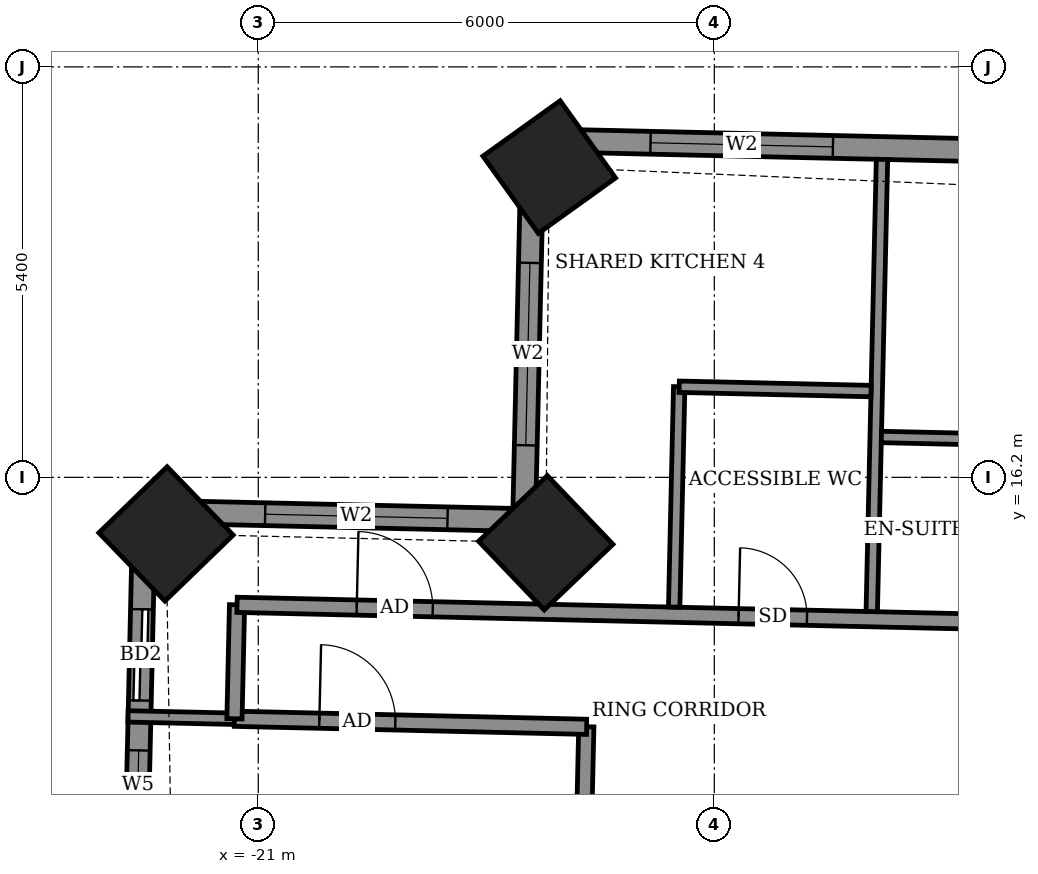
"""IFC4 building model, lengths in metres.
Left out: names, types, materials, properties, quantities, classifications, styles, units other than length and angle.
Written with IfcOpenShell. Run it as: python <this file> out.ifc"""

import sys

from ifc_helpers import new_model, si_unit, direction, frame, frame_2d, origin, origin_2d, place, context, subcontext, project, spatial, rectangle, extrude, element, fill, save


model = new_model("IFC4")
c1 = context("Model", 3, precision=1e-05, world=origin(), true_north=direction((0.0, 1.0)))
c2 = subcontext(c1, "Body", "Model", "MODEL_VIEW")
j1 = project(units=[si_unit("LENGTHUNIT", "METRE"), si_unit("PLANEANGLEUNIT", "RADIAN")], contexts=[c1])
p1 = place(None, origin())
s1 = spatial("IfcSite", under=j1, at=p1, CompositionType="ELEMENT")
p2 = place(p1, origin())
s2 = spatial("IfcBuilding", under=s1, at=p2, CompositionType="ELEMENT")
p3 = place(p2, frame((0.0, 0.0, 163.5)))
s3 = spatial("IfcBuildingStorey", under=s2, at=p3, CompositionType="ELEMENT", Elevation=163.5)
for number, where, z_axis, x_axis in (
    (1, (-17.172, 20.282, -0.55), (0.0, 0.0, 1.0), (-0.813, -0.583, 0.0)),
    (2, (-17.217, 15.339, -0.55), (0.0, 0.0, 1.0), (-0.723, -0.691, 0.0)),
    (3, (-22.213, 15.456, -0.55), (0.0, 0.0, 1.0), (-0.719, -0.695, 0.0)),
):
    element("IfcColumn", number, at=place(p3, frame(where, z_axis=z_axis, x_axis=x_axis)), inside=s3, PredefinedType="COLUMN", context=c2, shape_type="SweptSolid", body=[
        extrude(rectangle(XDim=1.25, YDim=1.25, at=origin_2d()), origin(), (0.0, 0.0, 1.0), 3.6),
    ])
p4 = place(p3, frame((22.181, 19.739, 0.0), z_axis=(0.0, 0.0, 1.0), x_axis=(-0.999742618326, 0.022686936846, 0.0)))
e4 = element("IfcWall", 4, at=p4, inside=s3, PredefinedType="SOLIDWALL", context=c2, shape_type="SweptSolid", body=[
    extrude(rectangle(XDim=39.58, YDim=0.3, at=frame_2d((19.79, 0.0))), origin(), (0.0, 0.0, 1.0), 3.05),
])
p5 = place(p4, frame((1.495, 0.0, 0.0)))
e5 = element("IfcOpeningElement", 5, at=p5, cuts=e4, PredefinedType="OPENING", context=c2, shape_type="SweptSolid", body=[
    extrude(rectangle(XDim=1.5, YDim=2.4, at=frame_2d((0.75, 1.2))), frame((0.0, 0.16, 0.0), z_axis=(0.0, -1.0, 0.0), x_axis=(1.0, 0.0, 0.0)), (0.0, 0.0, 1.0), 0.32),
])
p6 = place(p4, frame((4.151, 0.0, 0.0)))
e6 = element("IfcOpeningElement", 6, at=p6, cuts=e4, PredefinedType="OPENING", context=c2, shape_type="SweptSolid", body=[
    extrude(rectangle(XDim=1.5, YDim=2.4, at=frame_2d((0.75, 1.2))), frame((0.0, 0.16, 0.0), z_axis=(0.0, -1.0, 0.0), x_axis=(1.0, 0.0, 0.0)), (0.0, 0.0, 1.0), 0.32),
])
p7 = place(p4, frame((9.455, 0.0, 0.0)))
e7 = element("IfcOpeningElement", 7, at=p7, cuts=e4, PredefinedType="OPENING", context=c2, shape_type="SweptSolid", body=[
    extrude(rectangle(XDim=1.5, YDim=2.4, at=frame_2d((0.75, 1.2))), frame((0.0, 0.16, 0.0), z_axis=(0.0, -1.0, 0.0), x_axis=(1.0, 0.0, 0.0)), (0.0, 0.0, 1.0), 0.32),
])
p8 = place(p4, frame((14.499, 0.0, 0.0)))
e8 = element("IfcOpeningElement", 8, at=p8, cuts=e4, PredefinedType="OPENING", context=c2, shape_type="SweptSolid", body=[
    extrude(rectangle(XDim=1.5, YDim=2.4, at=frame_2d((0.75, 1.2))), frame((0.0, 0.16, 0.0), z_axis=(0.0, -1.0, 0.0), x_axis=(1.0, 0.0, 0.0)), (0.0, 0.0, 1.0), 0.32),
])
p9 = place(p4, frame((17.448, 0.0, 0.0)))
e9 = element("IfcOpeningElement", 9, at=p9, cuts=e4, PredefinedType="OPENING", context=c2, shape_type="SweptSolid", body=[
    extrude(rectangle(XDim=1.5, YDim=2.4, at=frame_2d((0.75, 1.2))), frame((0.0, 0.16, 0.0), z_axis=(0.0, -1.0, 0.0), x_axis=(1.0, 0.0, 0.0)), (0.0, 0.0, 1.0), 0.32),
])
p10 = place(p4, frame((22.905, 0.0, 0.0)))
e10 = element("IfcOpeningElement", 10, at=p10, cuts=e4, PredefinedType="OPENING", context=c2, shape_type="SweptSolid", body=[
    extrude(rectangle(XDim=1.5, YDim=2.4, at=frame_2d((0.75, 1.2))), frame((0.0, 0.16, 0.0), z_axis=(0.0, -1.0, 0.0), x_axis=(1.0, 0.0, 0.0)), (0.0, 0.0, 1.0), 0.32),
])
p11 = place(p4, frame((27.846, 0.0, 0.0)))
e11 = element("IfcOpeningElement", 11, at=p11, cuts=e4, PredefinedType="OPENING", context=c2, shape_type="SweptSolid", body=[
    extrude(rectangle(XDim=1.5, YDim=2.4, at=frame_2d((0.75, 1.2))), frame((0.0, 0.16, 0.0), z_axis=(0.0, -1.0, 0.0), x_axis=(1.0, 0.0, 0.0)), (0.0, 0.0, 1.0), 0.32),
])
p12 = place(p4, frame((30.794, 0.0, 0.0)))
e12 = element("IfcOpeningElement", 12, at=p12, cuts=e4, PredefinedType="OPENING", context=c2, shape_type="SweptSolid", body=[
    extrude(rectangle(XDim=1.5, YDim=2.4, at=frame_2d((0.75, 1.2))), frame((0.0, 0.16, 0.0), z_axis=(0.0, -1.0, 0.0), x_axis=(1.0, 0.0, 0.0)), (0.0, 0.0, 1.0), 0.32),
])
p13 = place(p4, frame((35.63, 0.0, 0.9)))
e13 = element("IfcOpeningElement", 13, at=p13, cuts=e4, PredefinedType="OPENING", context=c2, shape_type="SweptSolid", body=[
    extrude(rectangle(XDim=2.4, YDim=1.5, at=frame_2d((1.2, 0.75))), frame((0.0, 0.16, 0.0), z_axis=(0.0, -1.0, 0.0), x_axis=(1.0, 0.0, 0.0)), (0.0, 0.0, 1.0), 0.32),
])
p14 = place(p3, frame((-17.389, 20.637, 0.0), z_axis=(0.0, 0.0, 1.0), x_axis=(-0.022801259434, -0.999740017489, 0.0)))
e14 = element("IfcWall", 14, at=p14, inside=s3, PredefinedType="SOLIDWALL", context=c2, shape_type="SweptSolid", body=[
    extrude(rectangle(XDim=5.0, YDim=0.3, at=frame_2d((2.5, 0.0))), origin(), (0.0, 0.0, 1.0), 2.55),
])
p15 = place(p14, frame((1.616, 0.0, 0.9)))
e15 = element("IfcOpeningElement", 15, at=p15, cuts=e14, PredefinedType="OPENING", context=c2, shape_type="SweptSolid", body=[
    extrude(rectangle(XDim=2.4, YDim=1.5, at=frame_2d((1.2, 0.75))), frame((0.0, 0.16, 0.0), z_axis=(0.0, -1.0, 0.0), x_axis=(1.0, 0.0, 0.0)), (0.0, 0.0, 1.0), 0.32),
])
p16 = place(p3, frame((-17.503, 15.638, 0.0), z_axis=(0.0, 0.0, 1.0), x_axis=(-0.999744350543, 0.022610474516, 0.0)))
e16 = element("IfcWall", 16, at=p16, inside=s3, PredefinedType="SOLIDWALL", context=c2, shape_type="SweptSolid", body=[
    extrude(rectangle(XDim=4.999, YDim=0.3, at=frame_2d((2.5, 0.0))), origin(), (0.0, 0.0, 1.0), 2.55),
])
p17 = place(p16, frame((1.007, 0.0, 0.9)))
e17 = element("IfcOpeningElement", 17, at=p17, cuts=e16, PredefinedType="OPENING", context=c2, shape_type="SweptSolid", body=[
    extrude(rectangle(XDim=2.4, YDim=1.5, at=frame_2d((1.2, 0.75))), frame((0.0, 0.16, 0.0), z_axis=(0.0, -1.0, 0.0), x_axis=(1.0, 0.0, 0.0)), (0.0, 0.0, 1.0), 0.32),
])
p18 = place(p3, frame((-22.501, 15.751, 0.0), z_axis=(0.0, 0.0, 1.0), x_axis=(-0.022737995473, -0.999741458359, 0.0)))
e18 = element("IfcWall", 18, at=p18, inside=s3, PredefinedType="SOLIDWALL", context=c2, shape_type="SweptSolid", body=[
    extrude(rectangle(XDim=10.029, YDim=0.3, at=frame_2d((5.014, 0.0))), origin(), (0.0, 0.0, 1.0), 3.05),
])
p19 = place(p18, frame((1.287, 0.0, 0.0)))
e19 = element("IfcOpeningElement", 19, at=p19, cuts=e18, PredefinedType="OPENING", context=c2, shape_type="SweptSolid", body=[
    extrude(rectangle(XDim=1.2, YDim=2.4, at=frame_2d((0.6, 1.2))), frame((0.0, 0.16, 0.0), z_axis=(0.0, -1.0, 0.0), x_axis=(1.0, 0.0, 0.0)), (0.0, 0.0, 1.0), 0.32),
])
p20 = place(p18, frame((3.144, 0.0, 0.9)))
e20 = element("IfcOpeningElement", 20, at=p20, cuts=e18, PredefinedType="OPENING", context=c2, shape_type="SweptSolid", body=[
    extrude(rectangle(XDim=0.9, YDim=1.5, at=frame_2d((0.45, 0.75))), frame((0.0, 0.16, 0.0), z_axis=(0.0, -1.0, 0.0), x_axis=(1.0, 0.0, 0.0)), (0.0, 0.0, 1.0), 0.32),
])
p21 = place(p18, frame((6.437, 0.0, 0.9)))
e21 = element("IfcOpeningElement", 21, at=p21, cuts=e18, PredefinedType="OPENING", context=c2, shape_type="SweptSolid", body=[
    extrude(rectangle(XDim=2.4, YDim=1.5, at=frame_2d((1.2, 0.75))), frame((0.0, 0.16, 0.0), z_axis=(0.0, -1.0, 0.0), x_axis=(1.0, 0.0, 0.0)), (0.0, 0.0, 1.0), 0.32),
])
p22 = place(p3, frame((-17.32, -15.098, 0.0), z_axis=(0.0, 0.0, 1.0), x_axis=(0.022694293906, 0.999742451346, 0.0)))
e22 = element("IfcWall", 22, at=p22, inside=s3, PredefinedType="PARTITIONING", context=c2, shape_type="SweptSolid", body=[
    extrude(rectangle(XDim=28.024, YDim=0.2, at=frame_2d((14.012, 0.0))), origin(), (0.0, 0.0, 1.0), 3.05),
])
p23 = place(p22, frame((21.174, 0.0, 0.0)))
e23 = element("IfcOpeningElement", 23, at=p23, cuts=e22, PredefinedType="OPENING", context=c2, shape_type="SweptSolid", body=[
    extrude(rectangle(XDim=1.0, YDim=2.1, at=frame_2d((0.5, 1.05))), frame((0.0, 0.11, 0.0), z_axis=(0.0, -1.0, 0.0), x_axis=(1.0, 0.0, 0.0)), (0.0, 0.0, 1.0), 0.22),
])
p24 = place(p22, frame((23.349, 0.0, 0.0)))
e24 = element("IfcOpeningElement", 24, at=p24, cuts=e22, PredefinedType="OPENING", context=c2, shape_type="SweptSolid", body=[
    extrude(rectangle(XDim=0.9, YDim=2.1, at=frame_2d((0.45, 1.05))), frame((0.0, 0.11, 0.0), z_axis=(0.0, -1.0, 0.0), x_axis=(1.0, 0.0, 0.0)), (0.0, 0.0, 1.0), 0.22),
])
p25 = place(p22, frame((16.899, 0.0, 0.0)))
e25 = element("IfcOpeningElement", 25, at=p25, cuts=e22, PredefinedType="OPENING", context=c2, shape_type="SweptSolid", body=[
    extrude(rectangle(XDim=1.0, YDim=2.1, at=frame_2d((0.5, 1.05))), frame((0.0, 0.11, 0.0), z_axis=(0.0, -1.0, 0.0), x_axis=(1.0, 0.0, 0.0)), (0.0, 0.0, 1.0), 0.22),
])
p26 = place(p22, frame((19.099, 0.0, 0.0)))
e26 = element("IfcOpeningElement", 26, at=p26, cuts=e22, PredefinedType="OPENING", context=c2, shape_type="SweptSolid", body=[
    extrude(rectangle(XDim=0.9, YDim=2.1, at=frame_2d((0.45, 1.05))), frame((0.0, 0.11, 0.0), z_axis=(0.0, -1.0, 0.0), x_axis=(1.0, 0.0, 0.0)), (0.0, 0.0, 1.0), 0.22),
])
p27 = place(p22, frame((12.324, 0.0, 0.0)))
e27 = element("IfcOpeningElement", 27, at=p27, cuts=e22, PredefinedType="OPENING", context=c2, shape_type="SweptSolid", body=[
    extrude(rectangle(XDim=1.0, YDim=2.1, at=frame_2d((0.5, 1.05))), frame((0.0, 0.11, 0.0), z_axis=(0.0, -1.0, 0.0), x_axis=(1.0, 0.0, 0.0)), (0.0, 0.0, 1.0), 0.22),
])
p28 = place(p22, frame((14.699, 0.0, 0.0)))
e28 = element("IfcOpeningElement", 28, at=p28, cuts=e22, PredefinedType="OPENING", context=c2, shape_type="SweptSolid", body=[
    extrude(rectangle(XDim=0.9, YDim=2.1, at=frame_2d((0.45, 1.05))), frame((0.0, 0.11, 0.0), z_axis=(0.0, -1.0, 0.0), x_axis=(1.0, 0.0, 0.0)), (0.0, 0.0, 1.0), 0.22),
])
p29 = place(p22, frame((10.099, 0.0, 0.0)))
e29 = element("IfcOpeningElement", 29, at=p29, cuts=e22, PredefinedType="OPENING", context=c2, shape_type="SweptSolid", body=[
    extrude(rectangle(XDim=1.0, YDim=2.1, at=frame_2d((0.5, 1.05))), frame((0.0, 0.11, 0.0), z_axis=(0.0, -1.0, 0.0), x_axis=(1.0, 0.0, 0.0)), (0.0, 0.0, 1.0), 0.22),
])
p30 = place(p22, frame((7.749, 0.0, 0.0)))
e30 = element("IfcOpeningElement", 30, at=p30, cuts=e22, PredefinedType="OPENING", context=c2, shape_type="SweptSolid", body=[
    extrude(rectangle(XDim=0.9, YDim=2.1, at=frame_2d((0.45, 1.05))), frame((0.0, 0.11, 0.0), z_axis=(0.0, -1.0, 0.0), x_axis=(1.0, 0.0, 0.0)), (0.0, 0.0, 1.0), 0.22),
])
p31 = place(p22, frame((4.95, 0.0, 0.0)))
e31 = element("IfcOpeningElement", 31, at=p31, cuts=e22, PredefinedType="OPENING", context=c2, shape_type="SweptSolid", body=[
    extrude(rectangle(XDim=1.0, YDim=2.1, at=frame_2d((0.5, 1.05))), frame((0.0, 0.11, 0.0), z_axis=(0.0, -1.0, 0.0), x_axis=(1.0, 0.0, 0.0)), (0.0, 0.0, 1.0), 0.22),
])
p32 = place(p3, frame((-22.713, 13.055, 0.0), z_axis=(0.0, 0.0, 1.0), x_axis=(0.999756172383, -0.022081571112, 0.0)))
e32 = element("IfcWall", 32, at=p32, inside=s3, PredefinedType="PARTITIONING", context=c2, shape_type="SweptSolid", body=[
    extrude(rectangle(XDim=1.404, YDim=0.15, at=frame_2d((0.702, 0.0))), origin(), (0.0, 0.0, 1.0), 2.55),
])
p33 = place(p3, frame((-21.313, 13.024, 0.0), z_axis=(0.0, 0.0, 1.0), x_axis=(0.999738699021, -0.022858995594, 0.0)))
e33 = element("IfcWall", 33, at=p33, inside=s3, PredefinedType="PARTITIONING", context=c2, shape_type="SweptSolid", body=[
    extrude(rectangle(XDim=4.635, YDim=0.2, at=frame_2d((2.318, 0.0))), origin(), (0.0, 0.0, 1.0), 3.05),
])
p34 = place(p33, frame((1.117, 0.0, 0.0)))
e34 = element("IfcOpeningElement", 34, at=p34, cuts=e33, PredefinedType="OPENING", context=c2, shape_type="SweptSolid", body=[
    extrude(rectangle(XDim=1.0, YDim=2.1, at=frame_2d((0.5, 1.05))), frame((0.0, 0.11, 0.0), z_axis=(0.0, -1.0, 0.0), x_axis=(1.0, 0.0, 0.0)), (0.0, 0.0, 1.0), 0.22),
])
p35 = place(p3, frame((-21.313, 13.024, 0.0), z_axis=(0.0, 0.0, 1.0), x_axis=(0.022632637625, 0.99974384905, 0.0)))
e35 = element("IfcWall", 35, at=p35, inside=s3, PredefinedType="PARTITIONING", context=c2, shape_type="SweptSolid", body=[
    extrude(rectangle(XDim=1.5, YDim=0.2, at=frame_2d((0.75, 0.0))), origin(), (0.0, 0.0, 1.0), 3.05),
])
p36 = place(p3, frame((-21.279, 14.523, 0.0), z_axis=(0.0, 0.0, 1.0), x_axis=(0.999742669174, -0.02268469602, 0.0)))
e36 = element("IfcWall", 36, at=p36, inside=s3, PredefinedType="PARTITIONING", context=c2, shape_type="SweptSolid", body=[
    extrude(rectangle(XDim=40.639, YDim=0.2, at=frame_2d((20.319, 0.0))), origin(), (0.0, 0.0, 1.0), 3.05),
])
p37 = place(p36, frame((38.275, 0.0, 0.0)))
e37 = element("IfcOpeningElement", 37, at=p37, cuts=e36, PredefinedType="OPENING", context=c2, shape_type="SweptSolid", body=[
    extrude(rectangle(XDim=0.9, YDim=2.1, at=frame_2d((0.45, 1.05))), frame((0.0, 0.11, 0.0), z_axis=(0.0, -1.0, 0.0), x_axis=(1.0, 0.0, 0.0)), (0.0, 0.0, 1.0), 0.22),
])
p38 = place(p36, frame((31.475, 0.0, 0.0)))
e38 = element("IfcOpeningElement", 38, at=p38, cuts=e36, PredefinedType="OPENING", context=c2, shape_type="SweptSolid", body=[
    extrude(rectangle(XDim=0.9, YDim=2.1, at=frame_2d((0.45, 1.05))), frame((0.0, 0.11, 0.0), z_axis=(0.0, -1.0, 0.0), x_axis=(1.0, 0.0, 0.0)), (0.0, 0.0, 1.0), 0.22),
])
p39 = place(p36, frame((29.35, 0.0, 0.0)))
e39 = element("IfcOpeningElement", 39, at=p39, cuts=e36, PredefinedType="OPENING", context=c2, shape_type="SweptSolid", body=[
    extrude(rectangle(XDim=0.9, YDim=2.1, at=frame_2d((0.45, 1.05))), frame((0.0, 0.11, 0.0), z_axis=(0.0, -1.0, 0.0), x_axis=(1.0, 0.0, 0.0)), (0.0, 0.0, 1.0), 0.22),
])
p40 = place(p36, frame((22.45, 0.0, 0.0)))
e40 = element("IfcOpeningElement", 40, at=p40, cuts=e36, PredefinedType="OPENING", context=c2, shape_type="SweptSolid", body=[
    extrude(rectangle(XDim=0.9, YDim=2.1, at=frame_2d((0.45, 1.05))), frame((0.0, 0.11, 0.0), z_axis=(0.0, -1.0, 0.0), x_axis=(1.0, 0.0, 0.0)), (0.0, 0.0, 1.0), 0.22),
])
p41 = place(p36, frame((20.425, 0.0, 0.0)))
e41 = element("IfcOpeningElement", 41, at=p41, cuts=e36, PredefinedType="OPENING", context=c2, shape_type="SweptSolid", body=[
    extrude(rectangle(XDim=0.9, YDim=2.1, at=frame_2d((0.45, 1.05))), frame((0.0, 0.11, 0.0), z_axis=(0.0, -1.0, 0.0), x_axis=(1.0, 0.0, 0.0)), (0.0, 0.0, 1.0), 0.22),
])
p42 = place(p36, frame((13.575, 0.0, 0.0)))
e42 = element("IfcOpeningElement", 42, at=p42, cuts=e36, PredefinedType="OPENING", context=c2, shape_type="SweptSolid", body=[
    extrude(rectangle(XDim=0.9, YDim=2.1, at=frame_2d((0.45, 1.05))), frame((0.0, 0.11, 0.0), z_axis=(0.0, -1.0, 0.0), x_axis=(1.0, 0.0, 0.0)), (0.0, 0.0, 1.0), 0.22),
])
p43 = place(p36, frame((11.4, 0.0, 0.0)))
e43 = element("IfcOpeningElement", 43, at=p43, cuts=e36, PredefinedType="OPENING", context=c2, shape_type="SweptSolid", body=[
    extrude(rectangle(XDim=0.9, YDim=2.1, at=frame_2d((0.45, 1.05))), frame((0.0, 0.11, 0.0), z_axis=(0.0, -1.0, 0.0), x_axis=(1.0, 0.0, 0.0)), (0.0, 0.0, 1.0), 0.22),
])
p44 = place(p36, frame((1.575, 0.0, 0.0)))
e44 = element("IfcOpeningElement", 44, at=p44, cuts=e36, PredefinedType="OPENING", context=c2, shape_type="SweptSolid", body=[
    extrude(rectangle(XDim=1.0, YDim=2.1, at=frame_2d((0.5, 1.05))), frame((0.0, 0.11, 0.0), z_axis=(0.0, -1.0, 0.0), x_axis=(1.0, 0.0, 0.0)), (0.0, 0.0, 1.0), 0.22),
])
p45 = place(p36, frame((6.6, 0.0, 0.0)))
e45 = element("IfcOpeningElement", 45, at=p45, cuts=e36, PredefinedType="OPENING", context=c2, shape_type="SweptSolid", body=[
    extrude(rectangle(XDim=0.9, YDim=2.1, at=frame_2d((0.45, 1.05))), frame((0.0, 0.11, 0.0), z_axis=(0.0, -1.0, 0.0), x_axis=(1.0, 0.0, 0.0)), (0.0, 0.0, 1.0), 0.22),
])
p46 = place(p3, frame((-15.528, 14.493, 0.0), z_axis=(0.0, 0.0, 1.0), x_axis=(0.022815112345, 0.999739701447, 0.0)))
e46 = element("IfcWall", 46, at=p46, inside=s3, PredefinedType="PARTITIONING", context=c2, shape_type="SweptSolid", body=[
    extrude(rectangle(XDim=2.9, YDim=0.15, at=frame_2d((1.45, 0.0))), origin(), (0.0, 0.0, 1.0), 3.05),
])
p47 = place(p3, frame((-12.929, 14.434, 0.0), z_axis=(0.0, 0.0, 1.0), x_axis=(0.022688785847, 0.999742576365, 0.0)))
e47 = element("IfcWall", 47, at=p47, inside=s3, PredefinedType="PARTITIONING", context=c2, shape_type="SweptSolid", body=[
    extrude(rectangle(XDim=5.95, YDim=0.15, at=frame_2d((2.975, 0.0))), origin(), (0.0, 0.0, 1.0), 2.55),
])
p48 = place(p3, frame((-12.802, 16.731, 0.0), z_axis=(0.0, 0.0, 1.0), x_axis=(0.999749954681, -0.022361308448, 0.0)))
e48 = element("IfcWall", 48, at=p48, inside=s3, PredefinedType="PARTITIONING", context=c2, shape_type="SweptSolid", body=[
    extrude(rectangle(XDim=2.325, YDim=0.15, at=frame_2d((1.163, 0.0))), origin(), (0.0, 0.0, 1.0), 3.05),
])
p49 = place(p3, frame((-15.462, 17.392, 0.0), z_axis=(0.0, 0.0, 1.0), x_axis=(0.99974392816, -0.022629142889, 0.0)))
e49 = element("IfcWall", 49, at=p49, inside=s3, PredefinedType="PARTITIONING", context=c2, shape_type="SweptSolid", body=[
    extrude(rectangle(XDim=2.525, YDim=0.15, at=frame_2d((1.262, 0.0))), origin(), (0.0, 0.0, 1.0), 3.05),
])
p50 = place(p13, origin())
e50 = element("IfcWindow", 50, at=p50, inside=s3, PartitioningType="DOUBLE_PANEL_VERTICAL", PredefinedType="WINDOW", context=c2, shape_type="SweptSolid", body=[
    extrude(rectangle(XDim=2.4, YDim=1.5, at=frame_2d((1.2, 0.75))), frame((0.0, 0.03, 0.0), z_axis=(0.0, -1.0, 0.0), x_axis=(1.0, 0.0, 0.0)), (0.0, 0.0, 1.0), 0.06),
])
fill(e13, e50)
p51 = place(p15, origin())
e51 = element("IfcWindow", 51, at=p51, inside=s3, PartitioningType="DOUBLE_PANEL_VERTICAL", PredefinedType="WINDOW", context=c2, shape_type="SweptSolid", body=[
    extrude(rectangle(XDim=2.4, YDim=1.5, at=frame_2d((1.2, 0.75))), frame((0.0, 0.03, 0.0), z_axis=(0.0, -1.0, 0.0), x_axis=(1.0, 0.0, 0.0)), (0.0, 0.0, 1.0), 0.06),
])
fill(e15, e51)
p52 = place(p17, origin())
e52 = element("IfcWindow", 52, at=p52, inside=s3, PartitioningType="DOUBLE_PANEL_VERTICAL", PredefinedType="WINDOW", context=c2, shape_type="SweptSolid", body=[
    extrude(rectangle(XDim=2.4, YDim=1.5, at=frame_2d((1.2, 0.75))), frame((0.0, 0.03, 0.0), z_axis=(0.0, -1.0, 0.0), x_axis=(1.0, 0.0, 0.0)), (0.0, 0.0, 1.0), 0.06),
])
fill(e17, e52)
p53 = place(p19, origin())
e53 = element("IfcDoor", 53, at=p53, inside=s3, OperationType="SLIDING_TO_LEFT", PredefinedType="DOOR", context=c2, shape_type="SweptSolid", body=[
    extrude(rectangle(XDim=1.2, YDim=2.4, at=frame_2d((0.6, 1.2))), frame((0.0, 0.025, 0.0), z_axis=(0.0, -1.0, 0.0), x_axis=(1.0, 0.0, 0.0)), (0.0, 0.0, 1.0), 0.05),
])
fill(e19, e53)
p54 = place(p20, origin())
e54 = element("IfcWindow", 54, at=p54, inside=s3, PartitioningType="SINGLE_PANEL", PredefinedType="WINDOW", context=c2, shape_type="SweptSolid", body=[
    extrude(rectangle(XDim=0.9, YDim=1.5, at=frame_2d((0.45, 0.75))), frame((0.0, 0.03, 0.0), z_axis=(0.0, -1.0, 0.0), x_axis=(1.0, 0.0, 0.0)), (0.0, 0.0, 1.0), 0.06),
])
fill(e20, e54)
p55 = place(p44, origin())
e55 = element("IfcDoor", 55, at=p55, inside=s3, OperationType="SINGLE_SWING_LEFT", PredefinedType="DOOR", context=c2, shape_type="SweptSolid", body=[
    extrude(rectangle(XDim=1.0, YDim=2.1, at=frame_2d((0.5, 1.05))), frame((0.0, 0.025, 0.0), z_axis=(0.0, -1.0, 0.0), x_axis=(1.0, 0.0, 0.0)), (0.0, 0.0, 1.0), 0.05),
])
fill(e44, e55)
p56 = place(p45, origin())
e56 = element("IfcDoor", 56, at=p56, inside=s3, OperationType="SINGLE_SWING_LEFT", PredefinedType="DOOR", context=c2, shape_type="SweptSolid", body=[
    extrude(rectangle(XDim=0.9, YDim=2.1, at=frame_2d((0.45, 1.05))), frame((0.0, 0.025, 0.0), z_axis=(0.0, -1.0, 0.0), x_axis=(1.0, 0.0, 0.0)), (0.0, 0.0, 1.0), 0.05),
])
fill(e45, e56)
p57 = place(p34, origin())
e57 = element("IfcDoor", 57, at=p57, inside=s3, OperationType="SINGLE_SWING_RIGHT", PredefinedType="DOOR", context=c2, shape_type="SweptSolid", body=[
    extrude(rectangle(XDim=1.0, YDim=2.1, at=frame_2d((0.5, 1.05))), frame((0.0, 0.025, 0.0), z_axis=(0.0, -1.0, 0.0), x_axis=(1.0, 0.0, 0.0)), (0.0, 0.0, 1.0), 0.05),
])
fill(e34, e57)
save(model, sys.argv[1])
